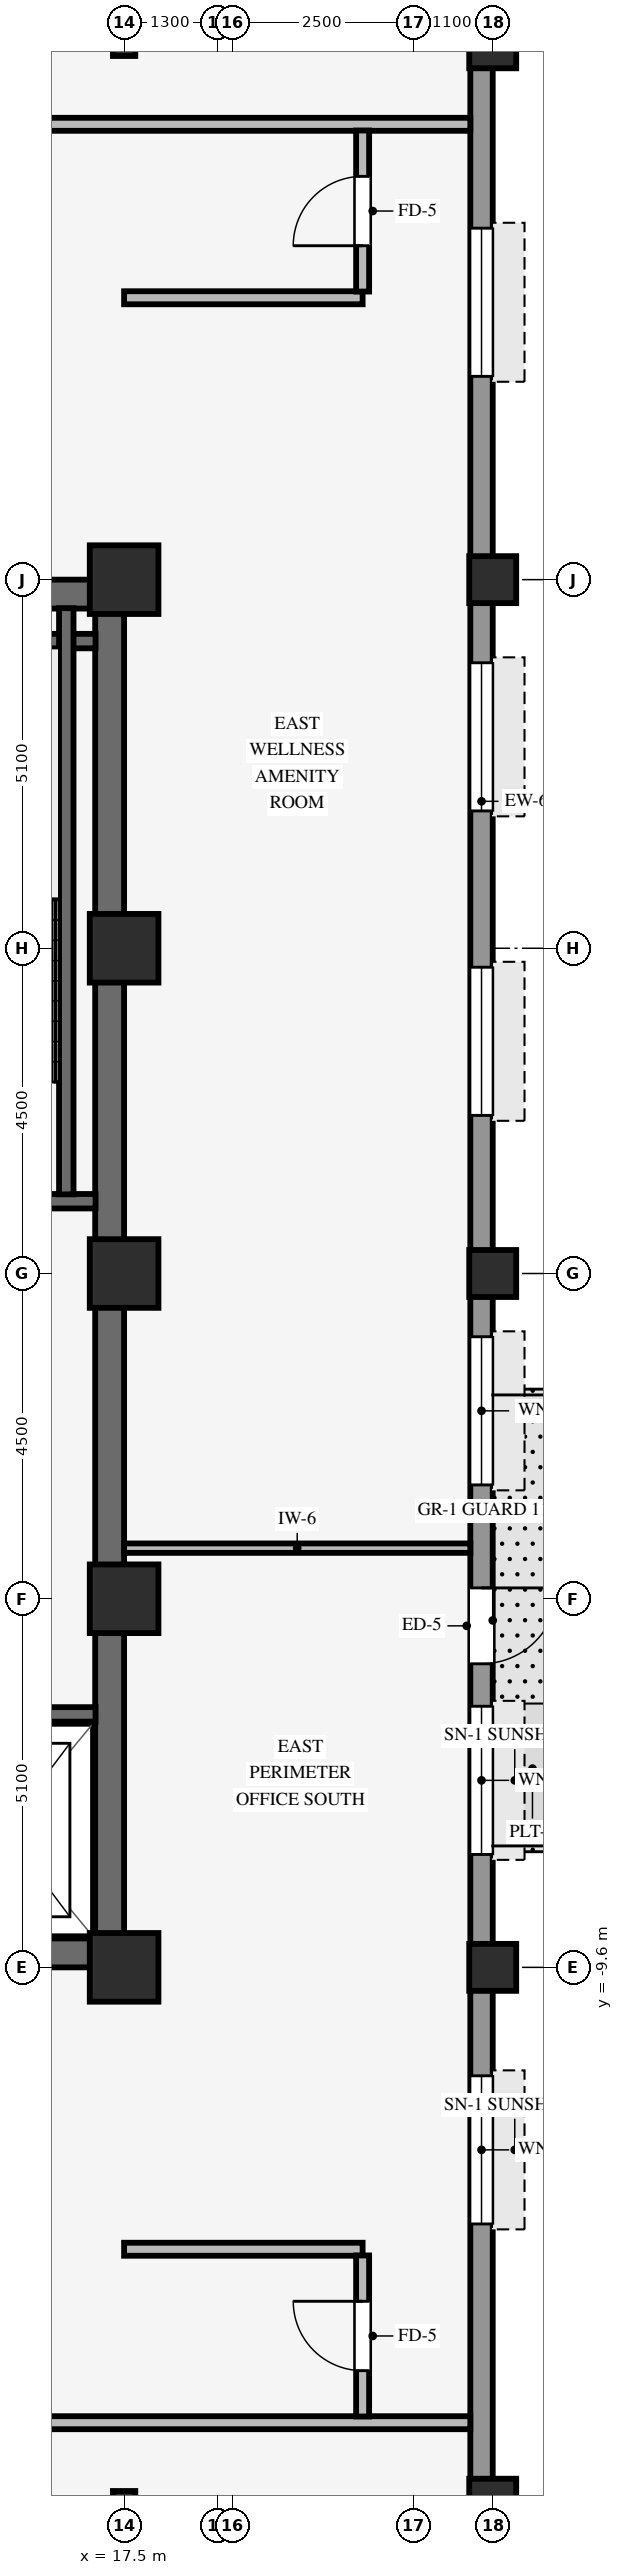
"""IFC4 building model, lengths in metres.
Left out: names, types, materials, properties, quantities, classifications, styles, units other than length and angle.
Written with IfcOpenShell. Run it as: python <this file> out.ifc"""

import sys

from ifc_helpers import new_model, si_unit, direction, frame, frame_2d, origin, origin_2d, place, context, subcontext, project, spatial, rectangle, hollow_rectangle, i_section, extrude, source, transform, mapped, element, fill, save


model = new_model("IFC4")
c1 = context("Model", 3, precision=1e-05, world=origin(), true_north=direction((0.0, 1.0)))
c2 = subcontext(c1, "Body", "Model", "MODEL_VIEW")
j1 = project(units=[si_unit("LENGTHUNIT", "METRE"), si_unit("PLANEANGLEUNIT", "RADIAN")], contexts=[c1])
p1 = place(None, origin())
s1 = spatial("IfcSite", under=j1, at=p1, CompositionType="ELEMENT")
p2 = place(p1, origin())
s2 = spatial("IfcBuilding", under=s1, at=p2, CompositionType="ELEMENT")
p3 = place(p2, frame((0.0, 0.0, 182.25)))
s3 = spatial("IfcBuildingStorey", under=s2, at=p3, CompositionType="ELEMENT", Elevation=182.25)
for number, where, z_axis, x_axis in (
    (1, (9.0, -9.4, 0.0), (0.0, 0.0, 1.0), (1.0, 0.0, 0.0)),
    (2, (9.0, 9.4, 0.0), (0.0, 0.0, 1.0), (1.0, 0.0, 0.0)),
):
    element("IfcWall", number, at=place(p3, frame(where, z_axis=z_axis, x_axis=x_axis)), inside=s3, PredefinedType="SHEAR", context=c2, shape_type="SweptSolid", body=[
        extrude(rectangle(XDim=8.5, YDim=0.4, at=frame_2d((4.25, 0.0))), origin(), (0.0, 0.0, 1.0), 3.25),
    ])
p4 = place(p3, frame((17.3, -9.205, 0.0), z_axis=(0.0, 0.0, 1.0), x_axis=(0.0, 1.0, 0.0)))
e3 = element("IfcWall", 3, at=p4, inside=s3, PredefinedType="SHEAR", context=c2, shape_type="SweptSolid", body=[
    extrude(rectangle(XDim=18.41, YDim=0.4, at=frame_2d((9.205, 0.0))), origin(), (0.0, 0.0, 1.0), 3.25),
])
for number, where, z_axis, x_axis in (
    (4, (17.5, -9.6, 0.0), (0.0, 0.0, 1.0), (1.0, 0.0, 0.0)),
    (5, (17.5, -4.5, 0.0), (0.0, 0.0, 1.0), (1.0, 0.0, 0.0)),
    (6, (17.5, 4.5, 0.0), (0.0, 0.0, 1.0), (1.0, 0.0, 0.0)),
    (7, (17.5, 9.6, 0.0), (0.0, 0.0, 1.0), (1.0, 0.0, 0.0)),
    (8, (17.5, 0.0, 0.0), (0.0, 0.0, 1.0), (1.0, 0.0, 0.0)),
):
    element("IfcColumn", number, at=place(p3, frame(where, z_axis=z_axis, x_axis=x_axis)), inside=s3, PredefinedType="COLUMN", context=c2, shape_type="SweptSolid", body=[
        extrude(rectangle(XDim=0.95, YDim=0.95, at=origin_2d()), origin(), (0.0, 0.0, 1.0), 3.25),
    ])
for number, where, z_axis, x_axis in (
    (9, (22.6, -17.0, 0.0), (0.0, 0.0, 1.0), (1.0, 0.0, 0.0)),
    (10, (22.6, -9.6, 0.0), (0.0, 0.0, 1.0), (1.0, 0.0, 0.0)),
    (11, (22.6, 0.0, 0.0), (0.0, 0.0, 1.0), (1.0, 0.0, 0.0)),
    (12, (22.6, 9.6, 0.0), (0.0, 0.0, 1.0), (1.0, 0.0, 0.0)),
    (13, (22.6, 17.0, 0.0), (0.0, 0.0, 1.0), (1.0, 0.0, 0.0)),
):
    element("IfcColumn", number, at=place(p3, frame(where, z_axis=z_axis, x_axis=x_axis)), inside=s3, PredefinedType="COLUMN", context=c2, shape_type="SweptSolid", body=[
        extrude(hollow_rectangle(XDim=0.65, YDim=0.65, WallThickness=0.04, InnerFilletRadius=0.04, OuterFilletRadius=0.08, at=origin_2d()), origin(), (0.0, 0.0, 1.0), 3.25),
    ])
for number, where, z_axis, x_axis in (
    (14, (17.5, -17.0, 0.0), (0.0, 0.0, 1.0), (1.0, 0.0, 0.0)),
    (15, (17.5, 17.0, 0.0), (0.0, 0.0, 1.0), (1.0, 0.0, 0.0)),
):
    element("IfcColumn", number, at=place(p3, frame(where, z_axis=z_axis, x_axis=x_axis)), inside=s3, PredefinedType="COLUMN", context=c2, shape_type="SweptSolid", body=[
        extrude(i_section(OverallWidth=0.31, OverallDepth=0.31, WebThickness=0.015, FlangeThickness=0.015, FilletRadius=0.015, at=origin_2d()), origin(), (0.0, 0.0, 1.0), 3.25),
    ])
p5 = place(p3, frame((22.445, -20.794, 0.0), z_axis=(0.0, 0.0, 1.0), x_axis=(0.0, 1.0, 0.0)))
e16 = element("IfcWall", 16, at=p5, inside=s3, PredefinedType="STANDARD", context=c2, shape_type="SweptSolid", body=[
    extrude(rectangle(XDim=37.788, YDim=0.31, at=frame_2d((18.894, 0.0))), origin(), (0.0, 0.0, 1.0), 2.585),
])
p6 = place(p5, frame((16.444, 0.0, 0.0), z_axis=(0.0, 0.0, 1.0), x_axis=(-1.0, 0.0, 0.0)))
e17 = element("IfcOpeningElement", 17, at=p6, cuts=e16, PredefinedType="OPENING", context=c2, shape_type="SweptSolid", body=[
    extrude(rectangle(XDim=1.05, YDim=2.1, at=frame_2d((0.525, 1.05))), frame((0.0, 0.165, 0.0), z_axis=(0.0, -1.0, 0.0), x_axis=(1.0, 0.0, 0.0)), (0.0, 0.0, 1.0), 0.33),
])
p7 = place(p5, frame((7.644, 0.0, 0.8)))
e18 = element("IfcOpeningElement", 18, at=p7, cuts=e16, PredefinedType="OPENING", context=c2, shape_type="SweptSolid", body=[
    extrude(rectangle(XDim=2.05, YDim=1.52, at=frame_2d((1.025, 0.76))), frame((0.0, 0.165, 0.0), z_axis=(0.0, -1.0, 0.0), x_axis=(1.0, 0.0, 0.0)), (0.0, 0.0, 1.0), 0.33),
])
p8 = place(p5, frame((12.756, 0.0, 0.8)))
e19 = element("IfcOpeningElement", 19, at=p8, cuts=e16, PredefinedType="OPENING", context=c2, shape_type="SweptSolid", body=[
    extrude(rectangle(XDim=2.05, YDim=1.52, at=frame_2d((1.025, 0.76))), frame((0.0, 0.165, 0.0), z_axis=(0.0, -1.0, 0.0), x_axis=(1.0, 0.0, 0.0)), (0.0, 0.0, 1.0), 0.33),
])
p9 = place(p5, frame((17.869, 0.0, 0.8)))
e20 = element("IfcOpeningElement", 20, at=p9, cuts=e16, PredefinedType="OPENING", context=c2, shape_type="SweptSolid", body=[
    extrude(rectangle(XDim=2.05, YDim=1.52, at=frame_2d((1.025, 0.76))), frame((0.0, 0.165, 0.0), z_axis=(0.0, -1.0, 0.0), x_axis=(1.0, 0.0, 0.0)), (0.0, 0.0, 1.0), 0.33),
])
p10 = place(p5, frame((22.982, 0.0, 0.8)))
e21 = element("IfcOpeningElement", 21, at=p10, cuts=e16, PredefinedType="OPENING", context=c2, shape_type="SweptSolid", body=[
    extrude(rectangle(XDim=2.05, YDim=1.52, at=frame_2d((1.025, 0.76))), frame((0.0, 0.165, 0.0), z_axis=(0.0, -1.0, 0.0), x_axis=(1.0, 0.0, 0.0)), (0.0, 0.0, 1.0), 0.33),
])
p11 = place(p5, frame((27.194, 0.0, 0.8)))
e22 = element("IfcOpeningElement", 22, at=p11, cuts=e16, PredefinedType="OPENING", context=c2, shape_type="SweptSolid", body=[
    extrude(rectangle(XDim=2.05, YDim=1.52, at=frame_2d((1.025, 0.76))), frame((0.0, 0.165, 0.0), z_axis=(0.0, -1.0, 0.0), x_axis=(1.0, 0.0, 0.0)), (0.0, 0.0, 1.0), 0.33),
])
p12 = place(p5, frame((33.207, 0.0, 0.8)))
e23 = element("IfcOpeningElement", 23, at=p12, cuts=e16, PredefinedType="OPENING", context=c2, shape_type="SweptSolid", body=[
    extrude(rectangle(XDim=2.05, YDim=1.52, at=frame_2d((1.025, 0.76))), frame((0.0, 0.165, 0.0), z_axis=(0.0, -1.0, 0.0), x_axis=(1.0, 0.0, 0.0)), (0.0, 0.0, 1.0), 0.33),
])
for number, where, z_axis, x_axis in (
    (24, (13.535, 1.0, 0.0), (0.0, 0.0, 1.0), (1.0, 0.0, 0.0)),
    (25, (13.535, 8.75, 0.0), (0.0, 0.0, 1.0), (1.0, 0.0, 0.0)),
):
    element("IfcWall", number, at=place(p3, frame(where, z_axis=z_axis, x_axis=x_axis)), inside=s3, PredefinedType="SHEAR", context=c2, shape_type="SweptSolid", body=[
        extrude(rectangle(XDim=3.57, YDim=0.2, at=frame_2d((1.785, 0.0))), origin(), (0.0, 0.0, 1.0), 3.25),
    ])
p13 = place(p3, frame((16.7, 1.095, 0.0), z_axis=(0.0, 0.0, 1.0), x_axis=(0.0, 1.0, 0.0)))
e26 = element("IfcWall", 26, at=p13, inside=s3, PredefinedType="SHEAR", context=c2, shape_type="SweptSolid", body=[
    extrude(rectangle(XDim=8.11, YDim=0.2, at=frame_2d((4.055, 0.0))), origin(), (0.0, 0.0, 1.0), 3.25),
])
p14 = place(p3, frame((14.645, -6.1, 0.0), z_axis=(0.0, 0.0, 1.0), x_axis=(1.0, 0.0, 0.0)))
e27 = element("IfcWall", 27, at=p14, inside=s3, PredefinedType="SHEAR", context=c2, shape_type="SweptSolid", body=[
    extrude(rectangle(XDim=2.46, YDim=0.2, at=frame_2d((1.23, 0.0))), origin(), (0.0, 0.0, 1.0), 3.25),
])
p15 = place(p3, frame((-26.09, -15.9, 0.0), z_axis=(0.0, 0.0, 1.0), x_axis=(1.0, 0.0, 0.0)))
e28 = element("IfcWall", 28, at=p15, inside=s3, PredefinedType="PARTITIONING", context=c2, shape_type="SweptSolid", body=[
    extrude(rectangle(XDim=48.38, YDim=0.18, at=frame_2d((24.19, 0.0))), origin(), (0.0, 0.0, 1.0), 3.24),
])
p16 = place(p15, frame((40.51, 0.0, 0.0)))
e29 = element("IfcOpeningElement", 29, at=p16, cuts=e28, PredefinedType="OPENING", context=c2, shape_type="SweptSolid", body=[
    extrude(rectangle(XDim=0.96, YDim=2.1, at=frame_2d((0.48, 1.05))), frame((0.0, 0.1, 0.0), z_axis=(0.0, -1.0, 0.0), x_axis=(1.0, 0.0, 0.0)), (0.0, 0.0, 1.0), 0.2),
])
p17 = place(p15, frame((19.995, 0.0, 0.0)))
e30 = element("IfcOpeningElement", 30, at=p17, cuts=e28, PredefinedType="OPENING", context=c2, shape_type="SweptSolid", body=[
    extrude(rectangle(XDim=0.96, YDim=2.1, at=frame_2d((0.48, 1.05))), frame((0.0, 0.1, 0.0), z_axis=(0.0, -1.0, 0.0), x_axis=(1.0, 0.0, 0.0)), (0.0, 0.0, 1.0), 0.2),
])
p18 = place(p15, frame((28.45, 0.0, 0.0)))
e31 = element("IfcOpeningElement", 31, at=p18, cuts=e28, PredefinedType="OPENING", context=c2, shape_type="SweptSolid", body=[
    extrude(rectangle(XDim=0.96, YDim=2.1, at=frame_2d((0.48, 1.05))), frame((0.0, 0.1, 0.0), z_axis=(0.0, -1.0, 0.0), x_axis=(1.0, 0.0, 0.0)), (0.0, 0.0, 1.0), 0.2),
])
p19 = place(p15, frame((11.605, 0.0, 0.0)))
e32 = element("IfcOpeningElement", 32, at=p19, cuts=e28, PredefinedType="OPENING", context=c2, shape_type="SweptSolid", body=[
    extrude(rectangle(XDim=0.96, YDim=2.1, at=frame_2d((0.48, 1.05))), frame((0.0, 0.1, 0.0), z_axis=(0.0, -1.0, 0.0), x_axis=(1.0, 0.0, 0.0)), (0.0, 0.0, 1.0), 0.2),
])
p20 = place(p15, frame((2.465, 0.0, 0.0)))
e33 = element("IfcOpeningElement", 33, at=p20, cuts=e28, PredefinedType="OPENING", context=c2, shape_type="SweptSolid", body=[
    extrude(rectangle(XDim=0.96, YDim=2.1, at=frame_2d((0.48, 1.05))), frame((0.0, 0.1, 0.0), z_axis=(0.0, -1.0, 0.0), x_axis=(1.0, 0.0, 0.0)), (0.0, 0.0, 1.0), 0.2),
])
p21 = place(p3, frame((17.5, -13.5, 0.0), z_axis=(0.0, 0.0, 1.0), x_axis=(1.0, 0.0, 0.0)))
e34 = element("IfcWall", 34, at=p21, inside=s3, PredefinedType="PARTITIONING", context=c2, shape_type="SweptSolid", body=[
    extrude(rectangle(XDim=3.3, YDim=0.18, at=frame_2d((1.65, 0.0))), origin(), (0.0, 0.0, 1.0), 2.888),
])
p22 = place(p3, frame((17.5, -3.8, 0.0), z_axis=(0.0, 0.0, 1.0), x_axis=(1.0, 0.0, 0.0)))
e35 = element("IfcWall", 35, at=p22, inside=s3, PredefinedType="PARTITIONING", context=c2, shape_type="SweptSolid", body=[
    extrude(rectangle(XDim=4.79, YDim=0.13, at=frame_2d((2.395, 0.0))), origin(), (0.0, 0.0, 1.0), 3.24),
])
p23 = place(p3, frame((17.5, 13.5, 0.0), z_axis=(0.0, 0.0, 1.0), x_axis=(1.0, 0.0, 0.0)))
e36 = element("IfcWall", 36, at=p23, inside=s3, PredefinedType="PARTITIONING", context=c2, shape_type="SweptSolid", body=[
    extrude(rectangle(XDim=3.3, YDim=0.18, at=frame_2d((1.65, 0.0))), origin(), (0.0, 0.0, 1.0), 2.888),
])
p24 = place(p3, frame((-26.09, 15.9, 0.0), z_axis=(0.0, 0.0, 1.0), x_axis=(1.0, 0.0, 0.0)))
e37 = element("IfcWall", 37, at=p24, inside=s3, PredefinedType="PARTITIONING", context=c2, shape_type="SweptSolid", body=[
    extrude(rectangle(XDim=48.38, YDim=0.18, at=frame_2d((24.19, 0.0))), origin(), (0.0, 0.0, 1.0), 3.24),
])
p25 = place(p24, frame((41.36, 0.0, 0.0)))
e38 = element("IfcOpeningElement", 38, at=p25, cuts=e37, PredefinedType="OPENING", context=c2, shape_type="SweptSolid", body=[
    extrude(rectangle(XDim=0.96, YDim=2.1, at=frame_2d((0.48, 1.05))), frame((0.0, 0.1, 0.0), z_axis=(0.0, -1.0, 0.0), x_axis=(1.0, 0.0, 0.0)), (0.0, 0.0, 1.0), 0.2),
])
p26 = place(p24, frame((23.35, 0.0, 0.0)))
e39 = element("IfcOpeningElement", 39, at=p26, cuts=e37, PredefinedType="OPENING", context=c2, shape_type="SweptSolid", body=[
    extrude(rectangle(XDim=0.96, YDim=2.1, at=frame_2d((0.48, 1.05))), frame((0.0, 0.1, 0.0), z_axis=(0.0, -1.0, 0.0), x_axis=(1.0, 0.0, 0.0)), (0.0, 0.0, 1.0), 0.2),
])
p27 = place(p24, frame((14.41, 0.0, 0.0)))
e40 = element("IfcOpeningElement", 40, at=p27, cuts=e37, PredefinedType="OPENING", context=c2, shape_type="SweptSolid", body=[
    extrude(rectangle(XDim=0.96, YDim=2.1, at=frame_2d((0.48, 1.05))), frame((0.0, 0.1, 0.0), z_axis=(0.0, -1.0, 0.0), x_axis=(1.0, 0.0, 0.0)), (0.0, 0.0, 1.0), 0.2),
])
p28 = place(p24, frame((30.015, 0.0, 0.0)))
e41 = element("IfcOpeningElement", 41, at=p28, cuts=e37, PredefinedType="OPENING", context=c2, shape_type="SweptSolid", body=[
    extrude(rectangle(XDim=0.96, YDim=2.1, at=frame_2d((0.48, 1.05))), frame((0.0, 0.1, 0.0), z_axis=(0.0, -1.0, 0.0), x_axis=(1.0, 0.0, 0.0)), (0.0, 0.0, 1.0), 0.2),
])
p29 = place(p24, frame((6.66, 0.0, 0.0)))
e42 = element("IfcOpeningElement", 42, at=p29, cuts=e37, PredefinedType="OPENING", context=c2, shape_type="SweptSolid", body=[
    extrude(rectangle(XDim=0.96, YDim=2.1, at=frame_2d((0.48, 1.05))), frame((0.0, 0.1, 0.0), z_axis=(0.0, -1.0, 0.0), x_axis=(1.0, 0.0, 0.0)), (0.0, 0.0, 1.0), 0.2),
])
p30 = place(p3, frame((20.8, -15.814, 0.0), z_axis=(0.0, 0.0, 1.0), x_axis=(0.0, 1.0, 0.0)))
e43 = element("IfcWall", 43, at=p30, inside=s3, PredefinedType="PARTITIONING", context=c2, shape_type="SweptSolid", body=[
    extrude(rectangle(XDim=2.228, YDim=0.18, at=frame_2d((1.114, 0.0))), origin(), (0.0, 0.0, 1.0), 3.24),
])
p31 = place(p30, frame((0.634, 0.0, 0.0)))
e44 = element("IfcOpeningElement", 44, at=p31, cuts=e43, PredefinedType="OPENING", context=c2, shape_type="SweptSolid", body=[
    extrude(rectangle(XDim=0.96, YDim=2.1, at=frame_2d((0.48, 1.05))), frame((0.0, 0.1, 0.0), z_axis=(0.0, -1.0, 0.0), x_axis=(1.0, 0.0, 0.0)), (0.0, 0.0, 1.0), 0.2),
])
p32 = place(p3, frame((20.8, 13.586, 0.0), z_axis=(0.0, 0.0, 1.0), x_axis=(0.0, 1.0, 0.0)))
e45 = element("IfcWall", 45, at=p32, inside=s3, PredefinedType="PARTITIONING", context=c2, shape_type="SweptSolid", body=[
    extrude(rectangle(XDim=2.228, YDim=0.18, at=frame_2d((1.114, 0.0))), origin(), (0.0, 0.0, 1.0), 3.24),
])
p33 = place(p32, frame((0.634, 0.0, 0.0)))
e46 = element("IfcOpeningElement", 46, at=p33, cuts=e45, PredefinedType="OPENING", context=c2, shape_type="SweptSolid", body=[
    extrude(rectangle(XDim=0.96, YDim=2.1, at=frame_2d((0.48, 1.05))), frame((0.0, 0.1, 0.0), z_axis=(0.0, -1.0, 0.0), x_axis=(1.0, 0.0, 0.0)), (0.0, 0.0, 1.0), 0.2),
])
m1 = source(origin(), c2, "Body", "SweptSolid", [
    extrude(rectangle(XDim=1.05, YDim=2.1, at=frame_2d((0.525, 1.05))), frame((0.0, 0.025, 0.0), z_axis=(0.0, -1.0, 0.0), x_axis=(1.0, 0.0, 0.0)), (0.0, 0.0, 1.0), 0.05),
])
p34 = place(p6, origin())
e47 = element("IfcDoor", 47, at=p34, inside=s3, OperationType="SINGLE_SWING_LEFT", PredefinedType="DOOR", context=c2, shape_type="MappedRepresentation", body=[
    mapped(m1, transform((0.0, 0.0, 0.0), scale=1.0)),
])
fill(e17, e47)
m2 = source(origin(), c2, "Body", "SweptSolid", [
    extrude(rectangle(XDim=2.05, YDim=1.52, at=frame_2d((1.025, 0.76))), frame((0.0, 0.03, 0.0), z_axis=(0.0, -1.0, 0.0), x_axis=(1.0, 0.0, 0.0)), (0.0, 0.0, 1.0), 0.06),
])
p35 = place(p7, origin())
e48 = element("IfcWindow", 48, at=p35, inside=s3, PartitioningType="SINGLE_PANEL", PredefinedType="WINDOW", context=c2, shape_type="MappedRepresentation", body=[
    mapped(m2, transform((0.0, 0.0, 0.0), scale=1.0)),
])
fill(e18, e48)
p36 = place(p8, origin())
e49 = element("IfcWindow", 49, at=p36, inside=s3, PartitioningType="SINGLE_PANEL", PredefinedType="WINDOW", context=c2, shape_type="MappedRepresentation", body=[
    mapped(m2, transform((0.0, 0.0, 0.0), scale=1.0)),
])
fill(e19, e49)
p37 = place(p9, origin())
e50 = element("IfcWindow", 50, at=p37, inside=s3, PartitioningType="SINGLE_PANEL", PredefinedType="WINDOW", context=c2, shape_type="MappedRepresentation", body=[
    mapped(m2, transform((0.0, 0.0, 0.0), scale=1.0)),
])
fill(e20, e50)
p38 = place(p10, origin())
e51 = element("IfcWindow", 51, at=p38, inside=s3, PartitioningType="SINGLE_PANEL", PredefinedType="WINDOW", context=c2, shape_type="MappedRepresentation", body=[
    mapped(m2, transform((0.0, 0.0, 0.0), scale=1.0)),
])
fill(e21, e51)
p39 = place(p11, origin())
e52 = element("IfcWindow", 52, at=p39, inside=s3, PartitioningType="SINGLE_PANEL", PredefinedType="WINDOW", context=c2, shape_type="MappedRepresentation", body=[
    mapped(m2, transform((0.0, 0.0, 0.0), scale=1.0)),
])
fill(e22, e52)
p40 = place(p12, origin())
e53 = element("IfcWindow", 53, at=p40, inside=s3, PartitioningType="SINGLE_PANEL", PredefinedType="WINDOW", context=c2, shape_type="MappedRepresentation", body=[
    mapped(m2, transform((0.0, 0.0, 0.0), scale=1.0)),
])
fill(e23, e53)
m3 = source(origin(), c2, "Body", "SweptSolid", [
    extrude(rectangle(XDim=0.96, YDim=2.1, at=frame_2d((0.48, 1.05))), frame((0.0, 0.025, 0.0), z_axis=(0.0, -1.0, 0.0), x_axis=(1.0, 0.0, 0.0)), (0.0, 0.0, 1.0), 0.05),
])
p41 = place(p31, origin())
e54 = element("IfcDoor", 54, at=p41, inside=s3, OperationType="SINGLE_SWING_RIGHT", PredefinedType="DOOR", context=c2, shape_type="MappedRepresentation", body=[
    mapped(m3, transform((0.0, 0.0, 0.0), scale=1.0)),
])
fill(e44, e54)
p42 = place(p33, origin())
e55 = element("IfcDoor", 55, at=p42, inside=s3, OperationType="SINGLE_SWING_LEFT", PredefinedType="DOOR", context=c2, shape_type="MappedRepresentation", body=[
    mapped(m3, transform((0.0, 0.0, 0.0), scale=1.0)),
])
fill(e46, e55)
save(model, sys.argv[1])
